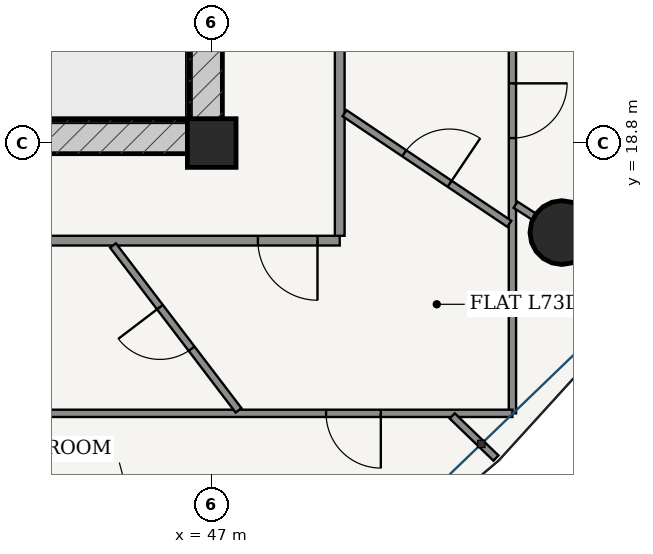
"""IFC4 building model, lengths in metres.
Left out: names, types, materials, properties, quantities, classifications, styles, units other than length and angle.
Written with IfcOpenShell. Run it as: python <this file> out.ifc"""

import sys

from ifc_helpers import new_model, si_unit, direction, frame, frame_2d, origin, origin_2d, place, context, subcontext, project, spatial, rectangle, hollow_circle, extrude, source, transform, mapped, element, fill, save


model = new_model("IFC4")
c1 = context("Model", 3, precision=1e-05, world=origin(), true_north=direction((-0.2419218956, 0.970295726276)))
c2 = subcontext(c1, "Body", "Model", "MODEL_VIEW")
j1 = project(units=[si_unit("LENGTHUNIT", "METRE"), si_unit("PLANEANGLEUNIT", "RADIAN")], contexts=[c1])
p1 = place(None, origin())
s1 = spatial("IfcSite", under=j1, at=p1, CompositionType="ELEMENT")
p2 = place(p1, origin())
s2 = spatial("IfcBuilding", under=s1, at=p2, CompositionType="ELEMENT")
p3 = place(p2, frame((0.0, 0.0, 278.2)))
s3 = spatial("IfcBuildingStorey", under=s2, at=p3, CompositionType="ELEMENT", Elevation=278.2)
p4 = place(p3, frame((47.0, 18.8, 0.0), z_axis=(0.0, 0.0, 1.0), x_axis=(1.0, 0.0, 0.0)))
e1 = element("IfcColumn", 1, at=p4, inside=s3, PredefinedType="COLUMN", context=c2, shape_type="SweptSolid", body=[
    extrude(rectangle(XDim=0.8, YDim=0.8, at=origin_2d()), origin(), (0.0, 0.0, 1.0), 3.75),
])
p5 = place(p3, frame((28.825, 18.9, 0.0), z_axis=(0.0, 0.0, 1.0), x_axis=(1.0, 0.0, 0.0)))
e2 = element("IfcWall", 2, at=p5, inside=s3, PredefinedType="SHEAR", context=c2, shape_type="SweptSolid", body=[
    extrude(rectangle(XDim=18.35, YDim=0.55, at=frame_2d((9.175, 0.0))), origin(), (0.0, 0.0, 1.0), 3.49),
])
p6 = place(p5, frame((6.71, 0.0, 0.0)))
e3 = element("IfcOpeningElement", 3, at=p6, cuts=e2, PredefinedType="OPENING", context=c2, shape_type="SweptSolid", body=[
    extrude(rectangle(XDim=0.85, YDim=2.1, at=frame_2d((0.425, 1.05))), frame((0.0, 0.285, 0.0), z_axis=(0.0, -1.0, 0.0), x_axis=(1.0, 0.0, 0.0)), (0.0, 0.0, 1.0), 0.57),
])
p7 = place(p5, frame((8.75, 0.0, 0.0)))
e4 = element("IfcOpeningElement", 4, at=p7, cuts=e2, PredefinedType="OPENING", context=c2, shape_type="SweptSolid", body=[
    extrude(rectangle(XDim=0.85, YDim=2.1, at=frame_2d((0.425, 1.05))), frame((0.0, 0.285, 0.0), z_axis=(0.0, -1.0, 0.0), x_axis=(1.0, 0.0, 0.0)), (0.0, 0.0, 1.0), 0.57),
])
p8 = place(p5, frame((10.79, 0.0, 0.0)))
e5 = element("IfcOpeningElement", 5, at=p8, cuts=e2, PredefinedType="OPENING", context=c2, shape_type="SweptSolid", body=[
    extrude(rectangle(XDim=0.85, YDim=2.1, at=frame_2d((0.425, 1.05))), frame((0.0, 0.285, 0.0), z_axis=(0.0, -1.0, 0.0), x_axis=(1.0, 0.0, 0.0)), (0.0, 0.0, 1.0), 0.57),
])
p9 = place(p3, frame((46.9, 19.175, 0.0), z_axis=(0.0, 0.0, 1.0), x_axis=(0.0, 1.0, 0.0)))
e6 = element("IfcWall", 6, at=p9, inside=s3, PredefinedType="SHEAR", context=c2, shape_type="SweptSolid", body=[
    extrude(rectangle(XDim=15.25, YDim=0.55, at=frame_2d((7.625, 0.0))), origin(), (0.0, 0.0, 1.0), 3.49),
])
p10 = place(p9, frame((9.875, 0.0, 0.0)))
e7 = element("IfcOpeningElement", 7, at=p10, cuts=e6, PredefinedType="OPENING", context=c2, shape_type="SweptSolid", body=[
    extrude(rectangle(XDim=1.5, YDim=2.2, at=frame_2d((0.75, 1.1))), frame((0.0, 0.285, 0.0), z_axis=(0.0, -1.0, 0.0), x_axis=(1.0, 0.0, 0.0)), (0.0, 0.0, 1.0), 0.57),
])
p11 = place(p3, frame((52.759, 17.328, 0.0), z_axis=(0.0, 0.0, 1.0), x_axis=(1.0, 0.0, 0.0)))
e8 = element("IfcColumn", 8, at=p11, inside=s3, PredefinedType="COLUMN", context=c2, shape_type="SweptSolid", body=[
    extrude(hollow_circle(Radius=0.525, WallThickness=0.035, at=origin_2d()), origin(), (0.0, 0.0, 1.0), 3.75),
])
p12 = place(p3, frame((26.895, 17.195, 0.0), z_axis=(0.0, 0.0, 1.0), x_axis=(1.0, 0.0, 0.0)))
e9 = element("IfcWall", 9, at=p12, inside=s3, PredefinedType="PARTITIONING", context=c2, shape_type="SweptSolid", body=[
    extrude(rectangle(XDim=22.21, YDim=0.16, at=frame_2d((11.105, 0.0))), origin(), (0.0, 0.0, 1.0), 3.015),
])
p13 = place(p12, frame((9.746, 0.0, 0.0)))
e10 = element("IfcOpeningElement", 10, at=p13, cuts=e9, PredefinedType="OPENING", context=c2, shape_type="SweptSolid", body=[
    extrude(rectangle(XDim=0.98, YDim=2.2, at=frame_2d((0.49, 1.1))), frame((0.0, 0.09, 0.0), z_axis=(0.0, -1.0, 0.0), x_axis=(1.0, 0.0, 0.0)), (0.0, 0.0, 1.0), 0.18),
])
p14 = place(p12, frame((20.864, 0.0, 0.0)))
e11 = element("IfcOpeningElement", 11, at=p14, cuts=e9, PredefinedType="OPENING", context=c2, shape_type="SweptSolid", body=[
    extrude(rectangle(XDim=0.98, YDim=2.2, at=frame_2d((0.49, 1.1))), frame((0.0, 0.09, 0.0), z_axis=(0.0, -1.0, 0.0), x_axis=(1.0, 0.0, 0.0)), (0.0, 0.0, 1.0), 0.18),
])
p15 = place(p3, frame((49.105, 17.275, 0.0), z_axis=(0.0, 0.0, 1.0), x_axis=(0.0, 1.0, 0.0)))
e12 = element("IfcWall", 12, at=p15, inside=s3, PredefinedType="PARTITIONING", context=c2, shape_type="SweptSolid", body=[
    extrude(rectangle(XDim=13.925, YDim=0.16, at=frame_2d((6.962, 0.0))), origin(), (0.0, 0.0, 1.0), 3.015),
])
p16 = place(p15, frame((11.75, 0.0, 0.0)))
e13 = element("IfcOpeningElement", 13, at=p16, cuts=e12, PredefinedType="OPENING", context=c2, shape_type="SweptSolid", body=[
    extrude(rectangle(XDim=0.98, YDim=2.2, at=frame_2d((0.49, 1.1))), frame((0.0, 0.09, 0.0), z_axis=(0.0, -1.0, 0.0), x_axis=(1.0, 0.0, 0.0)), (0.0, 0.0, 1.0), 0.18),
])
p17 = place(p3, frame((49.185, 22.334, 0.0), z_axis=(0.0, 0.0, 1.0), x_axis=(0.928710518269, -0.370805573389, 0.0)))
e14 = element("IfcWall", 14, at=p17, inside=s3, PredefinedType="PARTITIONING", context=c2, shape_type="SweptSolid", body=[
    extrude(rectangle(XDim=7.195, YDim=0.2, at=frame_2d((3.598, 0.0))), origin(), (0.0, 0.0, 1.0), 3.121),
])
p18 = place(p3, frame((42.162, 17.115, 0.0), z_axis=(0.0, 0.0, 1.0), x_axis=(0.394795631127, -0.918768964236, 0.0)))
e15 = element("IfcWall", 15, at=p18, inside=s3, PredefinedType="PARTITIONING", context=c2, shape_type="SweptSolid", body=[
    extrude(rectangle(XDim=8.202, YDim=0.2, at=frame_2d((4.101, 0.0))), origin(), (0.0, 0.0, 1.0), 3.121),
])
p19 = place(p3, frame((51.945, 21.13, 0.0), z_axis=(0.0, 0.0, 1.0), x_axis=(0.0, -1.0, 0.0)))
e16 = element("IfcWall", 16, at=p19, inside=s3, PredefinedType="PARTITIONING", context=c2, shape_type="SweptSolid", body=[
    extrude(rectangle(XDim=6.775, YDim=0.12, at=frame_2d((3.388, 0.0))), origin(), (0.0, 0.0, 1.0), 3.015),
])
p20 = place(p19, frame((1.349, 0.0, 0.0)))
e17 = element("IfcOpeningElement", 17, at=p20, cuts=e16, PredefinedType="OPENING", context=c2, shape_type="SweptSolid", body=[
    extrude(rectangle(XDim=0.9, YDim=2.15, at=frame_2d((0.45, 1.075))), frame((0.0, 0.07, 0.0), z_axis=(0.0, -1.0, 0.0), x_axis=(1.0, 0.0, 0.0)), (0.0, 0.0, 1.0), 0.14),
])
p21 = place(p3, frame((51.945, 14.355, 0.0), z_axis=(0.0, 0.0, 1.0), x_axis=(-1.0, 0.0, 0.0)))
e18 = element("IfcWall", 18, at=p21, inside=s3, PredefinedType="PARTITIONING", context=c2, shape_type="SweptSolid", body=[
    extrude(rectangle(XDim=8.495, YDim=0.12, at=frame_2d((4.248, 0.0))), origin(), (0.0, 0.0, 1.0), 3.015),
])
p22 = place(p21, frame((2.164, 0.0, 0.0)))
e19 = element("IfcOpeningElement", 19, at=p22, cuts=e18, PredefinedType="OPENING", context=c2, shape_type="SweptSolid", body=[
    extrude(rectangle(XDim=0.9, YDim=2.15, at=frame_2d((0.45, 1.075))), frame((0.0, 0.07, 0.0), z_axis=(0.0, -1.0, 0.0), x_axis=(1.0, 0.0, 0.0)), (0.0, 0.0, 1.0), 0.14),
])
p23 = place(p3, frame((50.956, 14.312, 0.0), z_axis=(0.0, 0.0, 1.0), x_axis=(0.7199490242, -0.694026946562, 0.0)))
e20 = element("IfcWall", 20, at=p23, inside=s3, PredefinedType="PARTITIONING", context=c2, shape_type="SweptSolid", body=[
    extrude(rectangle(XDim=0.998, YDim=0.12, at=frame_2d((0.499, 0.0))), origin(), (0.0, 0.0, 1.0), 3.49),
])
p24 = place(p3, frame((51.997, 17.785, 0.0), z_axis=(0.0, 0.0, 1.0), x_axis=(0.840715962824, -0.541476379774, 0.0)))
e21 = element("IfcWall", 21, at=p24, inside=s3, PredefinedType="PARTITIONING", context=c2, shape_type="SweptSolid", body=[
    extrude(rectangle(XDim=2.437, YDim=0.12, at=frame_2d((1.219, 0.0))), origin(), (0.0, 0.0, 1.0), 3.015),
])
p25 = place(p3, frame((45.377, 17.115, 0.0), z_axis=(0.0, 0.0, 1.0), x_axis=(0.60588776962, -0.795550130806, 0.0)))
e22 = element("IfcWall", 22, at=p25, inside=s3, PredefinedType="PARTITIONING", context=c2, shape_type="SweptSolid", body=[
    extrude(rectangle(XDim=3.407, YDim=0.12, at=frame_2d((1.704, 0.0))), origin(), (0.0, 0.0, 1.0), 3.209),
])
p26 = place(p25, frame((1.274, 0.0, 0.0)))
e23 = element("IfcOpeningElement", 23, at=p26, cuts=e22, PredefinedType="OPENING", context=c2, shape_type="SweptSolid", body=[
    extrude(rectangle(XDim=0.86, YDim=2.15, at=frame_2d((0.43, 1.075))), frame((0.0, 0.07, 0.0), z_axis=(0.0, -1.0, 0.0), x_axis=(1.0, 0.0, 0.0)), (0.0, 0.0, 1.0), 0.14),
])
p27 = place(p3, frame((49.185, 19.29, 0.0), z_axis=(0.0, 0.0, 1.0), x_axis=(0.830215193761, -0.557443030316, 0.0)))
e24 = element("IfcWall", 24, at=p27, inside=s3, PredefinedType="PARTITIONING", context=c2, shape_type="SweptSolid", body=[
    extrude(rectangle(XDim=3.262, YDim=0.12, at=frame_2d((1.631, 0.0))), origin(), (0.0, 0.0, 1.0), 3.209),
])
p28 = place(p27, frame((1.181, 0.0, 0.0)))
e25 = element("IfcOpeningElement", 25, at=p28, cuts=e24, PredefinedType="OPENING", context=c2, shape_type="SweptSolid", body=[
    extrude(rectangle(XDim=0.9, YDim=2.15, at=frame_2d((0.45, 1.075))), frame((0.0, 0.07, 0.0), z_axis=(0.0, -1.0, 0.0), x_axis=(1.0, 0.0, 0.0)), (0.0, 0.0, 1.0), 0.14),
])
m1 = source(origin(), c2, "Body", "SweptSolid", [
    extrude(rectangle(XDim=0.98, YDim=2.2, at=frame_2d((0.49, 1.1))), frame((0.0, 0.025, 0.0), z_axis=(0.0, -1.0, 0.0), x_axis=(1.0, 0.0, 0.0)), (0.0, 0.0, 1.0), 0.05),
])
p29 = place(p14, frame((0.98, 0.0, 0.0), z_axis=(0.0, 0.0, 1.0), x_axis=(-1.0, 0.0, 0.0)))
e26 = element("IfcDoor", 26, at=p29, inside=s3, OperationType="SINGLE_SWING_LEFT", PredefinedType="DOOR", context=c2, shape_type="MappedRepresentation", body=[
    mapped(m1, transform((0.0, 0.0, 0.0), scale=1.0)),
])
fill(e11, e26)
m2 = source(origin(), c2, "Body", "SweptSolid", [
    extrude(rectangle(XDim=0.86, YDim=2.15, at=frame_2d((0.43, 1.075))), frame((0.0, 0.025, 0.0), z_axis=(0.0, -1.0, 0.0), x_axis=(1.0, 0.0, 0.0)), (0.0, 0.0, 1.0), 0.05),
])
p30 = place(p26, frame((0.86, 0.0, 0.0), z_axis=(0.0, 0.0, 1.0), x_axis=(-1.0, 0.0, 0.0)))
e27 = element("IfcDoor", 27, at=p30, inside=s3, OperationType="SINGLE_SWING_RIGHT", PredefinedType="DOOR", context=c2, shape_type="MappedRepresentation", body=[
    mapped(m2, transform((0.0, 0.0, 0.0), scale=1.0)),
])
fill(e23, e27)
m3 = source(origin(), c2, "Body", "SweptSolid", [
    extrude(rectangle(XDim=0.9, YDim=2.15, at=frame_2d((0.45, 1.075))), frame((0.0, 0.025, 0.0), z_axis=(0.0, -1.0, 0.0), x_axis=(1.0, 0.0, 0.0)), (0.0, 0.0, 1.0), 0.05),
])
p31 = place(p22, origin())
e28 = element("IfcDoor", 28, at=p31, inside=s3, OperationType="SINGLE_SWING_LEFT", PredefinedType="DOOR", context=c2, shape_type="MappedRepresentation", body=[
    mapped(m3, transform((0.0, 0.0, 0.0), scale=1.0)),
])
fill(e19, e28)
p32 = place(p28, origin())
e29 = element("IfcDoor", 29, at=p32, inside=s3, OperationType="SINGLE_SWING_RIGHT", PredefinedType="DOOR", context=c2, shape_type="MappedRepresentation", body=[
    mapped(m3, transform((0.0, 0.0, 0.0), scale=1.0)),
])
fill(e25, e29)
p33 = place(p20, origin())
e30 = element("IfcDoor", 30, at=p33, inside=s3, OperationType="SINGLE_SWING_LEFT", PredefinedType="DOOR", context=c2, shape_type="MappedRepresentation", body=[
    mapped(m3, transform((0.0, 0.0, 0.0), scale=1.0)),
])
fill(e17, e30)
save(model, sys.argv[1])
